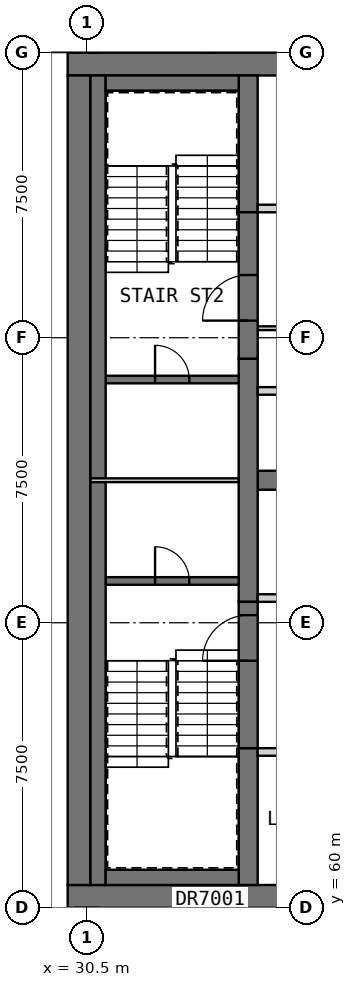
"""IFC4 building model, lengths in metres.
Left out: names, types, materials, properties, quantities, classifications, styles, units other than length and angle.
Written with IfcOpenShell. Run it as: python <this file> out.ifc"""

import sys

from ifc_helpers import new_model, si_unit, direction, frame, frame_2d, origin, place, context, subcontext, project, spatial, rectangle, extrude, element, fill, save


model = new_model("IFC4")
c1 = context("Model", 3, precision=1e-05, world=origin(), true_north=direction((0.0, 1.0)))
c2 = subcontext(c1, "Body", "Model", "MODEL_VIEW")
j1 = project(units=[si_unit("LENGTHUNIT", "METRE"), si_unit("PLANEANGLEUNIT", "RADIAN")], contexts=[c1])
p1 = place(None, origin())
s1 = spatial("IfcSite", under=j1, at=p1, CompositionType="ELEMENT")
p2 = place(p1, origin())
s2 = spatial("IfcBuilding", under=s1, at=p2, CompositionType="ELEMENT")
p3 = place(p2, frame((0.0, 0.0, 230.2)))
s3 = spatial("IfcBuildingStorey", under=s2, at=p3, CompositionType="ELEMENT", Elevation=230.2)
p4 = place(p3, frame((30.0, 60.3, 0.0), z_axis=(0.0, 0.0, 1.0), x_axis=(1.0, 0.0, 0.0)))
e1 = element("IfcWall", 1, at=p4, inside=s3, PredefinedType="SHEAR", context=c2, shape_type="SweptSolid", body=[
    extrude(rectangle(XDim=30.0, YDim=0.6, at=frame_2d((15.0, 0.0))), origin(), (0.0, 0.0, 1.0), 3.5),
])
p5 = place(p4, frame((21.9, 0.0, 0.0)))
e2 = element("IfcOpeningElement", 2, at=p5, cuts=e1, PredefinedType="OPENING", context=c2, shape_type="SweptSolid", body=[
    extrude(rectangle(XDim=1.8, YDim=2.1, at=frame_2d((0.9, 1.05))), frame((0.0, 0.31, 0.0), z_axis=(0.0, -1.0, 0.0), x_axis=(1.0, 0.0, 0.0)), (0.0, 0.0, 1.0), 0.62),
])
p6 = place(p4, frame((26.5, 0.0, 0.0)))
e3 = element("IfcOpeningElement", 3, at=p6, cuts=e1, PredefinedType="OPENING", context=c2, shape_type="SweptSolid", body=[
    extrude(rectangle(XDim=1.2, YDim=2.1, at=frame_2d((0.6, 1.05))), frame((0.0, 0.31, 0.0), z_axis=(0.0, -1.0, 0.0), x_axis=(1.0, 0.0, 0.0)), (0.0, 0.0, 1.0), 0.62),
])
p7 = place(p3, frame((30.0, 82.2, 0.0), z_axis=(0.0, 0.0, 1.0), x_axis=(1.0, 0.0, 0.0)))
e4 = element("IfcWall", 4, at=p7, inside=s3, PredefinedType="SHEAR", context=c2, shape_type="SweptSolid", body=[
    extrude(rectangle(XDim=30.0, YDim=0.6, at=frame_2d((15.0, 0.0))), origin(), (0.0, 0.0, 1.0), 3.5),
])
p8 = place(p3, frame((30.3, 60.6, 0.0), z_axis=(0.0, 0.0, 1.0), x_axis=(0.0, 1.0, 0.0)))
e5 = element("IfcWall", 5, at=p8, inside=s3, PredefinedType="SHEAR", context=c2, shape_type="SweptSolid", body=[
    extrude(rectangle(XDim=21.3, YDim=0.6, at=frame_2d((10.65, 0.0))), origin(), (0.0, 0.0, 1.0), 3.5),
])
p9 = place(p3, frame((35.0, 71.25, 0.0), z_axis=(0.0, 0.0, 1.0), x_axis=(1.0, 0.0, 0.0)))
e6 = element("IfcWall", 6, at=p9, inside=s3, PredefinedType="SHEAR", context=c2, shape_type="SweptSolid", body=[
    extrude(rectangle(XDim=15.6, YDim=0.5, at=frame_2d((7.8, 0.0))), origin(), (0.0, 0.0, 1.0), 3.5),
])
p10 = place(p3, frame((34.75, 60.6, 0.0), z_axis=(0.0, 0.0, 1.0), x_axis=(0.0, 1.0, 0.0)))
e7 = element("IfcWall", 7, at=p10, inside=s3, PredefinedType="SHEAR", context=c2, shape_type="SweptSolid", body=[
    extrude(rectangle(XDim=3.6, YDim=0.5, at=frame_2d((1.8, 0.0))), origin(), (0.0, 0.0, 1.0), 3.5),
])
p11 = place(p3, frame((34.75, 68.05, 0.0), z_axis=(0.0, 0.0, 1.0), x_axis=(0.0, 1.0, 0.0)))
e8 = element("IfcWall", 8, at=p11, inside=s3, PredefinedType="SHEAR", context=c2, shape_type="SweptSolid", body=[
    extrude(rectangle(XDim=6.4, YDim=0.5, at=frame_2d((3.2, 0.0))), origin(), (0.0, 0.0, 1.0), 3.5),
])
p12 = place(p3, frame((34.75, 78.3, 0.0), z_axis=(0.0, 0.0, 1.0), x_axis=(0.0, 1.0, 0.0)))
e9 = element("IfcWall", 9, at=p12, inside=s3, PredefinedType="SHEAR", context=c2, shape_type="SweptSolid", body=[
    extrude(rectangle(XDim=3.6, YDim=0.5, at=frame_2d((1.8, 0.0))), origin(), (0.0, 0.0, 1.0), 3.5),
])
p13 = place(p2, frame((0.0, 0.0, 34.0)))
s4 = spatial("IfcBuildingStorey", under=s2, at=p13, CompositionType="ELEMENT", Elevation=34.0)
for number, where, z_axis, x_axis in (
    (10, (29.7, 61.05, 0.0), (0.0, 0.0, 1.0), (0.0, 1.0, 0.0)),
    (11, (29.7, 65.925, 0.0), (0.0, 0.0, 1.0), (0.0, 1.0, 0.0)),
    (12, (29.7, 70.8, 0.0), (0.0, 0.0, 1.0), (0.0, 1.0, 0.0)),
    (13, (29.7, 75.675, 0.0), (0.0, 0.0, 1.0), (0.0, 1.0, 0.0)),
    (14, (29.7, 80.55, 0.0), (0.0, 0.0, 1.0), (0.0, 1.0, 0.0)),
):
    element("IfcWall", number, at=place(p13, frame(where, z_axis=z_axis, x_axis=x_axis)), inside=s4, PredefinedType="SOLIDWALL", context=c2, shape_type="SweptSolid", body=[
        extrude(rectangle(XDim=0.9, YDim=0.6, at=frame_2d((0.45, 0.0))), origin(), (0.0, 0.0, 1.0), 286.2),
    ])
p14 = place(p3, frame((35.0, 64.1, 0.0), z_axis=(0.0, 0.0, 1.0), x_axis=(1.0, 0.0, 0.0)))
e15 = element("IfcWall", 15, at=p14, inside=s3, PredefinedType="PARTITIONING", context=c2, shape_type="SweptSolid", body=[
    extrude(rectangle(XDim=15.6, YDim=0.2, at=frame_2d((7.8, 0.0))), origin(), (0.0, 0.0, 1.0), 3.25),
])
p15 = place(p14, frame((1.5, 0.0, 0.0)))
e16 = element("IfcOpeningElement", 16, at=p15, cuts=e15, PredefinedType="OPENING", context=c2, shape_type="SweptSolid", body=[
    extrude(rectangle(XDim=0.9, YDim=2.1, at=frame_2d((0.45, 1.05))), frame((0.0, 0.11, 0.0), z_axis=(0.0, -1.0, 0.0), x_axis=(1.0, 0.0, 0.0)), (0.0, 0.0, 1.0), 0.22),
])
p16 = place(p14, frame((5.4, 0.0, 0.0)))
e17 = element("IfcOpeningElement", 17, at=p16, cuts=e15, PredefinedType="OPENING", context=c2, shape_type="SweptSolid", body=[
    extrude(rectangle(XDim=0.9, YDim=2.1, at=frame_2d((0.45, 1.05))), frame((0.0, 0.11, 0.0), z_axis=(0.0, -1.0, 0.0), x_axis=(1.0, 0.0, 0.0)), (0.0, 0.0, 1.0), 0.22),
])
p17 = place(p14, frame((9.3, 0.0, 0.0)))
e18 = element("IfcOpeningElement", 18, at=p17, cuts=e15, PredefinedType="OPENING", context=c2, shape_type="SweptSolid", body=[
    extrude(rectangle(XDim=0.9, YDim=2.1, at=frame_2d((0.45, 1.05))), frame((0.0, 0.11, 0.0), z_axis=(0.0, -1.0, 0.0), x_axis=(1.0, 0.0, 0.0)), (0.0, 0.0, 1.0), 0.22),
])
p18 = place(p14, frame((13.2, 0.0, 0.0)))
e19 = element("IfcOpeningElement", 19, at=p18, cuts=e15, PredefinedType="OPENING", context=c2, shape_type="SweptSolid", body=[
    extrude(rectangle(XDim=0.9, YDim=2.1, at=frame_2d((0.45, 1.05))), frame((0.0, 0.11, 0.0), z_axis=(0.0, -1.0, 0.0), x_axis=(1.0, 0.0, 0.0)), (0.0, 0.0, 1.0), 0.22),
])
p19 = place(p3, frame((35.0, 68.15, 0.0), z_axis=(0.0, 0.0, 1.0), x_axis=(1.0, 0.0, 0.0)))
e20 = element("IfcWall", 20, at=p19, inside=s3, PredefinedType="PARTITIONING", context=c2, shape_type="SweptSolid", body=[
    extrude(rectangle(XDim=15.6, YDim=0.2, at=frame_2d((7.8, 0.0))), origin(), (0.0, 0.0, 1.0), 3.25),
])
p20 = place(p19, frame((2.675, 0.0, 0.0)))
e21 = element("IfcOpeningElement", 21, at=p20, cuts=e20, PredefinedType="OPENING", context=c2, shape_type="SweptSolid", body=[
    extrude(rectangle(XDim=0.9, YDim=2.1, at=frame_2d((0.45, 1.05))), frame((0.0, 0.11, 0.0), z_axis=(0.0, -1.0, 0.0), x_axis=(1.0, 0.0, 0.0)), (0.0, 0.0, 1.0), 0.22),
])
p21 = place(p19, frame((10.475, 0.0, 0.0)))
e22 = element("IfcOpeningElement", 22, at=p21, cuts=e20, PredefinedType="OPENING", context=c2, shape_type="SweptSolid", body=[
    extrude(rectangle(XDim=0.9, YDim=2.1, at=frame_2d((0.45, 1.05))), frame((0.0, 0.11, 0.0), z_axis=(0.0, -1.0, 0.0), x_axis=(1.0, 0.0, 0.0)), (0.0, 0.0, 1.0), 0.22),
])
p22 = place(p3, frame((35.0, 73.6, 0.0), z_axis=(0.0, 0.0, 1.0), x_axis=(1.0, 0.0, 0.0)))
e23 = element("IfcWall", 23, at=p22, inside=s3, PredefinedType="SOLIDWALL", context=c2, shape_type="SweptSolid", body=[
    extrude(rectangle(XDim=15.6, YDim=0.2, at=frame_2d((7.8, 0.0))), origin(), (0.0, 0.0, 1.0), 3.5),
])
p23 = place(p22, frame((0.75, 0.0, 0.0)))
e24 = element("IfcOpeningElement", 24, at=p23, cuts=e23, PredefinedType="OPENING", context=c2, shape_type="SweptSolid", body=[
    extrude(rectangle(XDim=1.1, YDim=2.1, at=frame_2d((0.55, 1.05))), frame((0.0, 0.11, 0.0), z_axis=(0.0, -1.0, 0.0), x_axis=(1.0, 0.0, 0.0)), (0.0, 0.0, 1.0), 0.22),
])
p24 = place(p22, frame((3.35, 0.0, 0.0)))
e25 = element("IfcOpeningElement", 25, at=p24, cuts=e23, PredefinedType="OPENING", context=c2, shape_type="SweptSolid", body=[
    extrude(rectangle(XDim=1.1, YDim=2.1, at=frame_2d((0.55, 1.05))), frame((0.0, 0.11, 0.0), z_axis=(0.0, -1.0, 0.0), x_axis=(1.0, 0.0, 0.0)), (0.0, 0.0, 1.0), 0.22),
])
p25 = place(p22, frame((5.95, 0.0, 0.0)))
e26 = element("IfcOpeningElement", 26, at=p25, cuts=e23, PredefinedType="OPENING", context=c2, shape_type="SweptSolid", body=[
    extrude(rectangle(XDim=1.1, YDim=2.1, at=frame_2d((0.55, 1.05))), frame((0.0, 0.11, 0.0), z_axis=(0.0, -1.0, 0.0), x_axis=(1.0, 0.0, 0.0)), (0.0, 0.0, 1.0), 0.22),
])
p26 = place(p22, frame((8.55, 0.0, 0.0)))
e27 = element("IfcOpeningElement", 27, at=p26, cuts=e23, PredefinedType="OPENING", context=c2, shape_type="SweptSolid", body=[
    extrude(rectangle(XDim=1.1, YDim=2.1, at=frame_2d((0.55, 1.05))), frame((0.0, 0.11, 0.0), z_axis=(0.0, -1.0, 0.0), x_axis=(1.0, 0.0, 0.0)), (0.0, 0.0, 1.0), 0.22),
])
p27 = place(p22, frame((11.15, 0.0, 0.0)))
e28 = element("IfcOpeningElement", 28, at=p27, cuts=e23, PredefinedType="OPENING", context=c2, shape_type="SweptSolid", body=[
    extrude(rectangle(XDim=1.1, YDim=2.1, at=frame_2d((0.55, 1.05))), frame((0.0, 0.11, 0.0), z_axis=(0.0, -1.0, 0.0), x_axis=(1.0, 0.0, 0.0)), (0.0, 0.0, 1.0), 0.22),
])
p28 = place(p22, frame((13.75, 0.0, 0.0)))
e29 = element("IfcOpeningElement", 29, at=p28, cuts=e23, PredefinedType="OPENING", context=c2, shape_type="SweptSolid", body=[
    extrude(rectangle(XDim=1.1, YDim=2.1, at=frame_2d((0.55, 1.05))), frame((0.0, 0.11, 0.0), z_axis=(0.0, -1.0, 0.0), x_axis=(1.0, 0.0, 0.0)), (0.0, 0.0, 1.0), 0.22),
])
p29 = place(p3, frame((35.0, 78.4, 0.0), z_axis=(0.0, 0.0, 1.0), x_axis=(1.0, 0.0, 0.0)))
e30 = element("IfcWall", 30, at=p29, inside=s3, PredefinedType="SOLIDWALL", context=c2, shape_type="SweptSolid", body=[
    extrude(rectangle(XDim=15.6, YDim=0.2, at=frame_2d((7.8, 0.0))), origin(), (0.0, 0.0, 1.0), 3.5),
])
p30 = place(p29, frame((0.75, 0.0, 0.0)))
e31 = element("IfcOpeningElement", 31, at=p30, cuts=e30, PredefinedType="OPENING", context=c2, shape_type="SweptSolid", body=[
    extrude(rectangle(XDim=1.1, YDim=2.1, at=frame_2d((0.55, 1.05))), frame((0.0, 0.11, 0.0), z_axis=(0.0, -1.0, 0.0), x_axis=(1.0, 0.0, 0.0)), (0.0, 0.0, 1.0), 0.22),
])
p31 = place(p29, frame((3.35, 0.0, 0.0)))
e32 = element("IfcOpeningElement", 32, at=p31, cuts=e30, PredefinedType="OPENING", context=c2, shape_type="SweptSolid", body=[
    extrude(rectangle(XDim=1.1, YDim=2.1, at=frame_2d((0.55, 1.05))), frame((0.0, 0.11, 0.0), z_axis=(0.0, -1.0, 0.0), x_axis=(1.0, 0.0, 0.0)), (0.0, 0.0, 1.0), 0.22),
])
p32 = place(p29, frame((11.15, 0.0, 0.0)))
e33 = element("IfcOpeningElement", 33, at=p32, cuts=e30, PredefinedType="OPENING", context=c2, shape_type="SweptSolid", body=[
    extrude(rectangle(XDim=1.1, YDim=2.1, at=frame_2d((0.55, 1.05))), frame((0.0, 0.11, 0.0), z_axis=(0.0, -1.0, 0.0), x_axis=(1.0, 0.0, 0.0)), (0.0, 0.0, 1.0), 0.22),
])
p33 = place(p29, frame((13.75, 0.0, 0.0)))
e34 = element("IfcOpeningElement", 34, at=p33, cuts=e30, PredefinedType="OPENING", context=c2, shape_type="SweptSolid", body=[
    extrude(rectangle(XDim=1.1, YDim=2.1, at=frame_2d((0.55, 1.05))), frame((0.0, 0.11, 0.0), z_axis=(0.0, -1.0, 0.0), x_axis=(1.0, 0.0, 0.0)), (0.0, 0.0, 1.0), 0.22),
])
p34 = place(p3, frame((35.0, 75.25, 0.0), z_axis=(0.0, 0.0, 1.0), x_axis=(1.0, 0.0, 0.0)))
e35 = element("IfcWall", 35, at=p34, inside=s3, PredefinedType="PARTITIONING", context=c2, shape_type="SweptSolid", body=[
    extrude(rectangle(XDim=5.25, YDim=0.1, at=frame_2d((2.625, 0.0))), origin(), (0.0, 0.0, 1.0), 3.25),
])
p35 = place(p3, frame((34.75, 64.2, 0.0), z_axis=(0.0, 0.0, 1.0), x_axis=(0.0, 1.0, 0.0)))
e36 = element("IfcWall", 36, at=p35, inside=s3, PredefinedType="SOLIDWALL", context=c2, shape_type="SweptSolid", body=[
    extrude(rectangle(XDim=3.85, YDim=0.5, at=frame_2d((1.925, 0.0))), origin(), (0.0, 0.0, 1.0), 2.3),
])
p36 = place(p35, frame((2.3, 0.0, 0.0)))
e37 = element("IfcOpeningElement", 37, at=p36, cuts=e36, PredefinedType="OPENING", context=c2, shape_type="SweptSolid", body=[
    extrude(rectangle(XDim=1.2, YDim=2.1, at=frame_2d((0.6, 1.05))), frame((0.0, 0.26, 0.0), z_axis=(0.0, -1.0, 0.0), x_axis=(1.0, 0.0, 0.0)), (0.0, 0.0, 1.0), 0.52),
])
p37 = place(p3, frame((34.75, 74.45, 0.0), z_axis=(0.0, 0.0, 1.0), x_axis=(0.0, 1.0, 0.0)))
e38 = element("IfcWall", 38, at=p37, inside=s3, PredefinedType="SOLIDWALL", context=c2, shape_type="SweptSolid", body=[
    extrude(rectangle(XDim=3.85, YDim=0.5, at=frame_2d((1.925, 0.0))), origin(), (0.0, 0.0, 1.0), 2.3),
])
p38 = place(p37, frame((1.0, 0.0, 0.0)))
e39 = element("IfcOpeningElement", 39, at=p38, cuts=e38, PredefinedType="OPENING", context=c2, shape_type="SweptSolid", body=[
    extrude(rectangle(XDim=1.2, YDim=2.1, at=frame_2d((0.6, 1.05))), frame((0.0, 0.26, 0.0), z_axis=(0.0, -1.0, 0.0), x_axis=(1.0, 0.0, 0.0)), (0.0, 0.0, 1.0), 0.52),
])
p39 = place(p3, frame((30.6, 68.6, 0.0), z_axis=(0.0, 0.0, 1.0), x_axis=(1.0, 0.0, 0.0)))
e40 = element("IfcWall", 40, at=p39, inside=s3, PredefinedType="SOLIDWALL", context=c2, shape_type="SweptSolid", body=[
    extrude(rectangle(XDim=3.9, YDim=0.2, at=frame_2d((1.95, 0.0))), origin(), (0.0, 0.0, 1.0), 3.25),
])
p40 = place(p39, frame((1.7, 0.0, 0.0)))
e41 = element("IfcOpeningElement", 41, at=p40, cuts=e40, PredefinedType="OPENING", context=c2, shape_type="SweptSolid", body=[
    extrude(rectangle(XDim=0.9, YDim=2.1, at=frame_2d((0.45, 1.05))), frame((0.0, 0.11, 0.0), z_axis=(0.0, -1.0, 0.0), x_axis=(1.0, 0.0, 0.0)), (0.0, 0.0, 1.0), 0.22),
])
p41 = place(p3, frame((30.6, 73.9, 0.0), z_axis=(0.0, 0.0, 1.0), x_axis=(1.0, 0.0, 0.0)))
e42 = element("IfcWall", 42, at=p41, inside=s3, PredefinedType="SOLIDWALL", context=c2, shape_type="SweptSolid", body=[
    extrude(rectangle(XDim=3.9, YDim=0.2, at=frame_2d((1.95, 0.0))), origin(), (0.0, 0.0, 1.0), 3.25),
])
p42 = place(p41, frame((1.7, 0.0, 0.0)))
e43 = element("IfcOpeningElement", 43, at=p42, cuts=e42, PredefinedType="OPENING", context=c2, shape_type="SweptSolid", body=[
    extrude(rectangle(XDim=0.9, YDim=2.1, at=frame_2d((0.45, 1.05))), frame((0.0, 0.11, 0.0), z_axis=(0.0, -1.0, 0.0), x_axis=(1.0, 0.0, 0.0)), (0.0, 0.0, 1.0), 0.22),
])
p43 = place(p3, frame((30.8, 60.6, 0.0), z_axis=(0.0, 0.0, 1.0), x_axis=(0.0, 1.0, 0.0)))
e44 = element("IfcWall", 44, at=p43, inside=s3, PredefinedType="SOLIDWALL", context=c2, shape_type="SweptSolid", body=[
    extrude(rectangle(XDim=21.3, YDim=0.4, at=frame_2d((10.65, 0.0))), origin(), (0.0, 0.0, 1.0), 3.25),
])
for number, where, z_axis, x_axis in (
    (45, (31.0, 60.8, 0.0), (0.0, 0.0, 1.0), (1.0, 0.0, 0.0)),
    (46, (31.0, 81.7, 0.0), (0.0, 0.0, 1.0), (1.0, 0.0, 0.0)),
):
    element("IfcWall", number, at=place(p3, frame(where, z_axis=z_axis, x_axis=x_axis)), inside=s3, PredefinedType="SOLIDWALL", context=c2, shape_type="SweptSolid", body=[
        extrude(rectangle(XDim=3.5, YDim=0.4, at=frame_2d((1.75, 0.0))), origin(), (0.0, 0.0, 1.0), 3.25),
    ])
p44 = place(p3, frame((30.6, 71.25, 0.0), z_axis=(0.0, 0.0, 1.0), x_axis=(1.0, 0.0, 0.0)))
e47 = element("IfcWall", 47, at=p44, inside=s3, PredefinedType="PARTITIONING", context=c2, shape_type="SweptSolid", body=[
    extrude(rectangle(XDim=3.9, YDim=0.1, at=frame_2d((1.95, 0.0))), origin(), (0.0, 0.0, 1.0), 3.25),
])
p45 = place(p36, origin())
e48 = element("IfcDoor", 48, at=p45, inside=s3, OperationType="SINGLE_SWING_LEFT", PredefinedType="DOOR", context=c2, shape_type="SweptSolid", body=[
    extrude(rectangle(XDim=1.2, YDim=2.1, at=frame_2d((0.6, 1.05))), frame((0.0, 0.025, 0.0), z_axis=(0.0, -1.0, 0.0), x_axis=(1.0, 0.0, 0.0)), (0.0, 0.0, 1.0), 0.05),
])
fill(e37, e48)
p46 = place(p38, origin())
e49 = element("IfcDoor", 49, at=p46, inside=s3, OperationType="SINGLE_SWING_RIGHT", PredefinedType="DOOR", context=c2, shape_type="SweptSolid", body=[
    extrude(rectangle(XDim=1.2, YDim=2.1, at=frame_2d((0.6, 1.05))), frame((0.0, 0.025, 0.0), z_axis=(0.0, -1.0, 0.0), x_axis=(1.0, 0.0, 0.0)), (0.0, 0.0, 1.0), 0.05),
])
fill(e39, e49)
p47 = place(p40, origin())
e50 = element("IfcDoor", 50, at=p47, inside=s3, OperationType="SINGLE_SWING_LEFT", PredefinedType="DOOR", context=c2, shape_type="SweptSolid", body=[
    extrude(rectangle(XDim=0.9, YDim=2.1, at=frame_2d((0.45, 1.05))), frame((0.0, 0.025, 0.0), z_axis=(0.0, -1.0, 0.0), x_axis=(1.0, 0.0, 0.0)), (0.0, 0.0, 1.0), 0.05),
])
fill(e41, e50)
p48 = place(p42, origin())
e51 = element("IfcDoor", 51, at=p48, inside=s3, OperationType="SINGLE_SWING_RIGHT", PredefinedType="DOOR", context=c2, shape_type="SweptSolid", body=[
    extrude(rectangle(XDim=0.9, YDim=2.1, at=frame_2d((0.45, 1.05))), frame((0.0, 0.025, 0.0), z_axis=(0.0, -1.0, 0.0), x_axis=(1.0, 0.0, 0.0)), (0.0, 0.0, 1.0), 0.05),
])
fill(e43, e51)
save(model, sys.argv[1])
